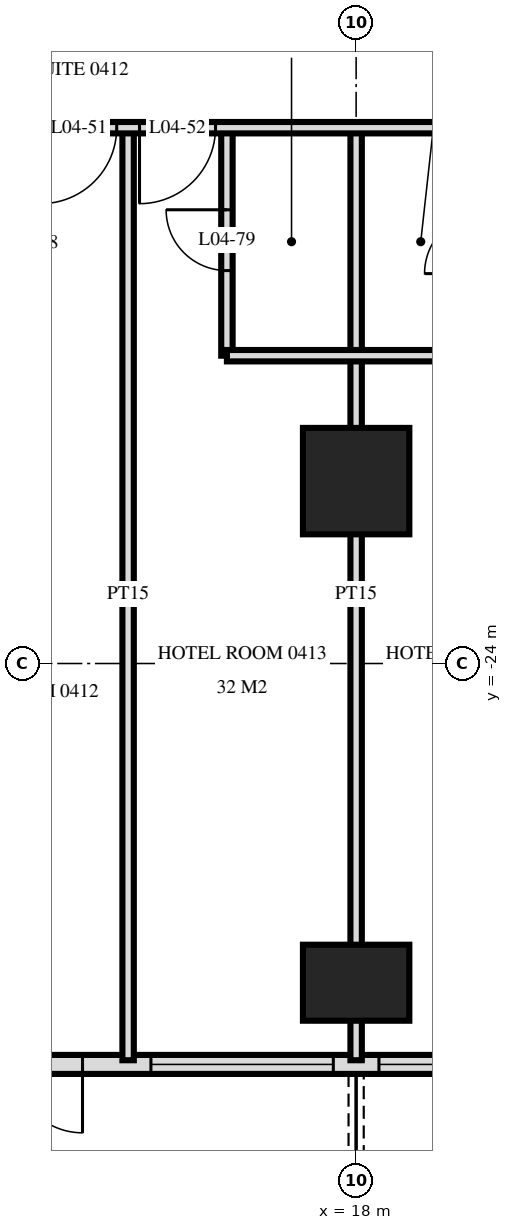
"""IFC4 building model, lengths in metres.
Left out: names, types, materials, properties, quantities, classifications, styles, units other than length and angle.
Written with IfcOpenShell. Run it as: python <this file> out.ifc"""

import sys

from ifc_helpers import new_model, si_unit, direction, frame, frame_2d, origin, origin_2d, place, context, subcontext, project, spatial, rectangle, extrude, element, fill, save


model = new_model("IFC4")
c1 = context("Model", 3, precision=1e-05, world=origin(), true_north=direction((0.0, 1.0)))
c2 = subcontext(c1, "Body", "Model", "MODEL_VIEW")
j1 = project(units=[si_unit("LENGTHUNIT", "METRE"), si_unit("PLANEANGLEUNIT", "RADIAN")], contexts=[c1])
p1 = place(None, origin())
s1 = spatial("IfcSite", under=j1, at=p1, CompositionType="ELEMENT")
p2 = place(p1, origin())
s2 = spatial("IfcBuilding", under=s1, at=p2, CompositionType="ELEMENT")
p3 = place(p2, frame((0.0, 0.0, 24.0)))
s3 = spatial("IfcBuildingStorey", under=s2, at=p3, CompositionType="ELEMENT", Elevation=24.0)
p4 = place(p3, frame((18.0, -28.2, -0.28), z_axis=(0.0, 0.0, 1.0), x_axis=(1.0, 0.0, 0.0)))
e1 = element("IfcColumn", 1, at=p4, inside=s3, PredefinedType="COLUMN", context=c2, shape_type="SweptSolid", body=[
    extrude(rectangle(XDim=1.4, YDim=1.0, at=origin_2d()), origin(), (0.0, 0.0, 1.0), 3.88),
])
p5 = place(p3, frame((18.0, -21.6, -0.28), z_axis=(0.0, 0.0, 1.0), x_axis=(1.0, 0.0, 0.0)))
e2 = element("IfcColumn", 2, at=p5, inside=s3, PredefinedType="COLUMN", context=c2, shape_type="SweptSolid", body=[
    extrude(rectangle(XDim=1.4, YDim=1.4, at=origin_2d()), origin(), (0.0, 0.0, 1.0), 3.88),
])
p6 = place(p3, frame((-28.775, -29.275, 0.0), z_axis=(0.0, 0.0, 1.0), x_axis=(1.0, 0.0, 0.0)))
e3 = element("IfcWall", 3, at=p6, inside=s3, PredefinedType="SOLIDWALL", context=c2, shape_type="SweptSolid", body=[
    extrude(rectangle(XDim=57.551, YDim=0.25, at=frame_2d((28.775, 0.0))), origin(), (0.0, 0.0, 1.0), 3.32),
])
p7 = place(p6, frame((0.575, 0.0, 0.0)))
e4 = element("IfcOpeningElement", 4, at=p7, cuts=e3, PredefinedType="OPENING", context=c2, shape_type="SweptSolid", body=[
    extrude(rectangle(XDim=1.8, YDim=2.4, at=frame_2d((0.9, 1.2))), frame((0.0, 0.135, 0.0), z_axis=(0.0, -1.0, 0.0), x_axis=(1.0, 0.0, 0.0)), (0.0, 0.0, 1.0), 0.27),
])
p8 = place(p6, frame((5.375, 0.0, 0.0)))
e5 = element("IfcOpeningElement", 5, at=p8, cuts=e3, PredefinedType="OPENING", context=c2, shape_type="SweptSolid", body=[
    extrude(rectangle(XDim=1.8, YDim=2.4, at=frame_2d((0.9, 1.2))), frame((0.0, 0.135, 0.0), z_axis=(0.0, -1.0, 0.0), x_axis=(1.0, 0.0, 0.0)), (0.0, 0.0, 1.0), 0.27),
])
p9 = place(p6, frame((8.075, 0.0, 0.3)))
e6 = element("IfcOpeningElement", 6, at=p9, cuts=e3, PredefinedType="OPENING", context=c2, shape_type="SweptSolid", body=[
    extrude(rectangle(XDim=2.4, YDim=2.1, at=frame_2d((1.2, 1.05))), frame((0.0, 0.135, 0.0), z_axis=(0.0, -1.0, 0.0), x_axis=(1.0, 0.0, 0.0)), (0.0, 0.0, 1.0), 0.27),
])
p10 = place(p6, frame((11.375, 0.0, 0.0)))
e7 = element("IfcOpeningElement", 7, at=p10, cuts=e3, PredefinedType="OPENING", context=c2, shape_type="SweptSolid", body=[
    extrude(rectangle(XDim=1.8, YDim=2.4, at=frame_2d((0.9, 1.2))), frame((0.0, 0.135, 0.0), z_axis=(0.0, -1.0, 0.0), x_axis=(1.0, 0.0, 0.0)), (0.0, 0.0, 1.0), 0.27),
])
p11 = place(p6, frame((14.075, 0.0, 0.3)))
e8 = element("IfcOpeningElement", 8, at=p11, cuts=e3, PredefinedType="OPENING", context=c2, shape_type="SweptSolid", body=[
    extrude(rectangle(XDim=2.4, YDim=2.1, at=frame_2d((1.2, 1.05))), frame((0.0, 0.135, 0.0), z_axis=(0.0, -1.0, 0.0), x_axis=(1.0, 0.0, 0.0)), (0.0, 0.0, 1.0), 0.27),
])
p12 = place(p6, frame((17.375, 0.0, 0.0)))
e9 = element("IfcOpeningElement", 9, at=p12, cuts=e3, PredefinedType="OPENING", context=c2, shape_type="SweptSolid", body=[
    extrude(rectangle(XDim=1.8, YDim=2.4, at=frame_2d((0.9, 1.2))), frame((0.0, 0.135, 0.0), z_axis=(0.0, -1.0, 0.0), x_axis=(1.0, 0.0, 0.0)), (0.0, 0.0, 1.0), 0.27),
])
p13 = place(p6, frame((20.075, 0.0, 0.3)))
e10 = element("IfcOpeningElement", 10, at=p13, cuts=e3, PredefinedType="OPENING", context=c2, shape_type="SweptSolid", body=[
    extrude(rectangle(XDim=2.4, YDim=2.1, at=frame_2d((1.2, 1.05))), frame((0.0, 0.135, 0.0), z_axis=(0.0, -1.0, 0.0), x_axis=(1.0, 0.0, 0.0)), (0.0, 0.0, 1.0), 0.27),
])
p14 = place(p6, frame((23.075, 0.0, 0.3)))
e11 = element("IfcOpeningElement", 11, at=p14, cuts=e3, PredefinedType="OPENING", context=c2, shape_type="SweptSolid", body=[
    extrude(rectangle(XDim=2.4, YDim=2.1, at=frame_2d((1.2, 1.05))), frame((0.0, 0.135, 0.0), z_axis=(0.0, -1.0, 0.0), x_axis=(1.0, 0.0, 0.0)), (0.0, 0.0, 1.0), 0.27),
])
p15 = place(p6, frame((26.375, 0.0, 0.0)))
e12 = element("IfcOpeningElement", 12, at=p15, cuts=e3, PredefinedType="OPENING", context=c2, shape_type="SweptSolid", body=[
    extrude(rectangle(XDim=1.8, YDim=2.4, at=frame_2d((0.9, 1.2))), frame((0.0, 0.135, 0.0), z_axis=(0.0, -1.0, 0.0), x_axis=(1.0, 0.0, 0.0)), (0.0, 0.0, 1.0), 0.27),
])
p16 = place(p6, frame((29.375, 0.0, 0.0)))
e13 = element("IfcOpeningElement", 13, at=p16, cuts=e3, PredefinedType="OPENING", context=c2, shape_type="SweptSolid", body=[
    extrude(rectangle(XDim=1.8, YDim=2.4, at=frame_2d((0.9, 1.2))), frame((0.0, 0.135, 0.0), z_axis=(0.0, -1.0, 0.0), x_axis=(1.0, 0.0, 0.0)), (0.0, 0.0, 1.0), 0.27),
])
p17 = place(p6, frame((32.075, 0.0, 0.3)))
e14 = element("IfcOpeningElement", 14, at=p17, cuts=e3, PredefinedType="OPENING", context=c2, shape_type="SweptSolid", body=[
    extrude(rectangle(XDim=2.4, YDim=2.1, at=frame_2d((1.2, 1.05))), frame((0.0, 0.135, 0.0), z_axis=(0.0, -1.0, 0.0), x_axis=(1.0, 0.0, 0.0)), (0.0, 0.0, 1.0), 0.27),
])
p18 = place(p6, frame((35.375, 0.0, 0.0)))
e15 = element("IfcOpeningElement", 15, at=p18, cuts=e3, PredefinedType="OPENING", context=c2, shape_type="SweptSolid", body=[
    extrude(rectangle(XDim=1.8, YDim=2.4, at=frame_2d((0.9, 1.2))), frame((0.0, 0.135, 0.0), z_axis=(0.0, -1.0, 0.0), x_axis=(1.0, 0.0, 0.0)), (0.0, 0.0, 1.0), 0.27),
])
p19 = place(p6, frame((38.075, 0.0, 0.3)))
e16 = element("IfcOpeningElement", 16, at=p19, cuts=e3, PredefinedType="OPENING", context=c2, shape_type="SweptSolid", body=[
    extrude(rectangle(XDim=2.4, YDim=2.1, at=frame_2d((1.2, 1.05))), frame((0.0, 0.135, 0.0), z_axis=(0.0, -1.0, 0.0), x_axis=(1.0, 0.0, 0.0)), (0.0, 0.0, 1.0), 0.27),
])
p20 = place(p6, frame((41.375, 0.0, 0.0)))
e17 = element("IfcOpeningElement", 17, at=p20, cuts=e3, PredefinedType="OPENING", context=c2, shape_type="SweptSolid", body=[
    extrude(rectangle(XDim=1.8, YDim=2.4, at=frame_2d((0.9, 1.2))), frame((0.0, 0.135, 0.0), z_axis=(0.0, -1.0, 0.0), x_axis=(1.0, 0.0, 0.0)), (0.0, 0.0, 1.0), 0.27),
])
p21 = place(p6, frame((44.075, 0.0, 0.3)))
e18 = element("IfcOpeningElement", 18, at=p21, cuts=e3, PredefinedType="OPENING", context=c2, shape_type="SweptSolid", body=[
    extrude(rectangle(XDim=2.4, YDim=2.1, at=frame_2d((1.2, 1.05))), frame((0.0, 0.135, 0.0), z_axis=(0.0, -1.0, 0.0), x_axis=(1.0, 0.0, 0.0)), (0.0, 0.0, 1.0), 0.27),
])
p22 = place(p6, frame((47.075, 0.0, 0.3)))
e19 = element("IfcOpeningElement", 19, at=p22, cuts=e3, PredefinedType="OPENING", context=c2, shape_type="SweptSolid", body=[
    extrude(rectangle(XDim=2.4, YDim=2.1, at=frame_2d((1.2, 1.05))), frame((0.0, 0.135, 0.0), z_axis=(0.0, -1.0, 0.0), x_axis=(1.0, 0.0, 0.0)), (0.0, 0.0, 1.0), 0.27),
])
p23 = place(p6, frame((50.375, 0.0, 0.0)))
e20 = element("IfcOpeningElement", 20, at=p23, cuts=e3, PredefinedType="OPENING", context=c2, shape_type="SweptSolid", body=[
    extrude(rectangle(XDim=1.8, YDim=2.4, at=frame_2d((0.9, 1.2))), frame((0.0, 0.135, 0.0), z_axis=(0.0, -1.0, 0.0), x_axis=(1.0, 0.0, 0.0)), (0.0, 0.0, 1.0), 0.27),
])
p24 = place(p6, frame((53.375, 0.0, 0.0)))
e21 = element("IfcOpeningElement", 21, at=p24, cuts=e3, PredefinedType="OPENING", context=c2, shape_type="SweptSolid", body=[
    extrude(rectangle(XDim=1.8, YDim=2.4, at=frame_2d((0.9, 1.2))), frame((0.0, 0.135, 0.0), z_axis=(0.0, -1.0, 0.0), x_axis=(1.0, 0.0, 0.0)), (0.0, 0.0, 1.0), 0.27),
])
p25 = place(p3, frame((18.0, -29.22, 0.0), z_axis=(0.0, 0.0, 1.0), x_axis=(0.0, 1.0, 0.0)))
e22 = element("IfcWall", 22, at=p25, inside=s3, PredefinedType="PARTITIONING", context=c2, shape_type="SweptSolid", body=[
    extrude(rectangle(XDim=12.27, YDim=0.15, at=frame_2d((6.135, 0.0))), origin(), (0.0, 0.0, 1.0), 3.32),
])
p26 = place(p3, frame((16.3, -19.95, 0.0), z_axis=(0.0, 0.0, 1.0), x_axis=(0.0, 1.0, 0.0)))
e23 = element("IfcWall", 23, at=p26, inside=s3, PredefinedType="PARTITIONING", context=c2, shape_type="SweptSolid", body=[
    extrude(rectangle(XDim=3.0, YDim=0.15, at=frame_2d((1.5, 0.0))), origin(), (0.0, 0.0, 1.0), 3.32),
])
p27 = place(p26, frame((1.12, 0.0, 0.0)))
e24 = element("IfcOpeningElement", 24, at=p27, cuts=e23, PredefinedType="OPENING", context=c2, shape_type="SweptSolid", body=[
    extrude(rectangle(XDim=0.8, YDim=2.1, at=frame_2d((0.4, 1.05))), frame((0.0, 0.085, 0.0), z_axis=(0.0, -1.0, 0.0), x_axis=(1.0, 0.0, 0.0)), (0.0, 0.0, 1.0), 0.17),
])
p28 = place(p3, frame((15.0, -29.22, 0.0), z_axis=(0.0, 0.0, 1.0), x_axis=(0.0, 1.0, 0.0)))
e25 = element("IfcWall", 25, at=p28, inside=s3, PredefinedType="PARTITIONING", context=c2, shape_type="SweptSolid", body=[
    extrude(rectangle(XDim=12.27, YDim=0.15, at=frame_2d((6.135, 0.0))), origin(), (0.0, 0.0, 1.0), 3.32),
])
p29 = place(p3, frame((16.3, -19.95, 0.0), z_axis=(0.0, 0.0, 1.0), x_axis=(1.0, 0.0, 0.0)))
e26 = element("IfcWall", 26, at=p29, inside=s3, PredefinedType="PARTITIONING", context=c2, shape_type="SweptSolid", body=[
    extrude(rectangle(XDim=3.4, YDim=0.15, at=frame_2d((1.7, 0.0))), origin(), (0.0, 0.0, 1.0), 3.32),
])
p30 = place(p3, frame((-33.12, -16.95, 0.0), z_axis=(0.0, 0.0, 1.0), x_axis=(1.0, 0.0, 0.0)))
e27 = element("IfcWall", 27, at=p30, inside=s3, PredefinedType="PARTITIONING", context=c2, shape_type="SweptSolid", body=[
    extrude(rectangle(XDim=66.24, YDim=0.15, at=frame_2d((33.12, 0.0))), origin(), (0.0, 0.0, 1.0), 3.32),
])
p31 = place(p30, frame((9.27, 0.0, 0.0)))
e28 = element("IfcOpeningElement", 28, at=p31, cuts=e27, PredefinedType="OPENING", context=c2, shape_type="SweptSolid", body=[
    extrude(rectangle(XDim=1.0, YDim=2.1, at=frame_2d((0.5, 1.05))), frame((0.0, 0.085, 0.0), z_axis=(0.0, -1.0, 0.0), x_axis=(1.0, 0.0, 0.0)), (0.0, 0.0, 1.0), 0.17),
])
p32 = place(p30, frame((13.97, 0.0, 0.0)))
e29 = element("IfcOpeningElement", 29, at=p32, cuts=e27, PredefinedType="OPENING", context=c2, shape_type="SweptSolid", body=[
    extrude(rectangle(XDim=1.0, YDim=2.1, at=frame_2d((0.5, 1.05))), frame((0.0, 0.085, 0.0), z_axis=(0.0, -1.0, 0.0), x_axis=(1.0, 0.0, 0.0)), (0.0, 0.0, 1.0), 0.17),
])
p33 = place(p30, frame((15.27, 0.0, 0.0)))
e30 = element("IfcOpeningElement", 30, at=p33, cuts=e27, PredefinedType="OPENING", context=c2, shape_type="SweptSolid", body=[
    extrude(rectangle(XDim=1.0, YDim=2.1, at=frame_2d((0.5, 1.05))), frame((0.0, 0.085, 0.0), z_axis=(0.0, -1.0, 0.0), x_axis=(1.0, 0.0, 0.0)), (0.0, 0.0, 1.0), 0.17),
])
p34 = place(p30, frame((19.97, 0.0, 0.0)))
e31 = element("IfcOpeningElement", 31, at=p34, cuts=e27, PredefinedType="OPENING", context=c2, shape_type="SweptSolid", body=[
    extrude(rectangle(XDim=1.0, YDim=2.1, at=frame_2d((0.5, 1.05))), frame((0.0, 0.085, 0.0), z_axis=(0.0, -1.0, 0.0), x_axis=(1.0, 0.0, 0.0)), (0.0, 0.0, 1.0), 0.17),
])
p35 = place(p30, frame((22.27, 0.0, 0.0)))
e32 = element("IfcOpeningElement", 32, at=p35, cuts=e27, PredefinedType="OPENING", context=c2, shape_type="SweptSolid", body=[
    extrude(rectangle(XDim=1.0, YDim=2.1, at=frame_2d((0.5, 1.05))), frame((0.0, 0.085, 0.0), z_axis=(0.0, -1.0, 0.0), x_axis=(1.0, 0.0, 0.0)), (0.0, 0.0, 1.0), 0.17),
])
p36 = place(p30, frame((28.97, 0.0, 0.0)))
e33 = element("IfcOpeningElement", 33, at=p36, cuts=e27, PredefinedType="OPENING", context=c2, shape_type="SweptSolid", body=[
    extrude(rectangle(XDim=1.0, YDim=2.1, at=frame_2d((0.5, 1.05))), frame((0.0, 0.085, 0.0), z_axis=(0.0, -1.0, 0.0), x_axis=(1.0, 0.0, 0.0)), (0.0, 0.0, 1.0), 0.17),
])
p37 = place(p30, frame((30.27, 0.0, 0.0)))
e34 = element("IfcOpeningElement", 34, at=p37, cuts=e27, PredefinedType="OPENING", context=c2, shape_type="SweptSolid", body=[
    extrude(rectangle(XDim=1.0, YDim=2.1, at=frame_2d((0.5, 1.05))), frame((0.0, 0.085, 0.0), z_axis=(0.0, -1.0, 0.0), x_axis=(1.0, 0.0, 0.0)), (0.0, 0.0, 1.0), 0.17),
])
p38 = place(p30, frame((34.97, 0.0, 0.0)))
e35 = element("IfcOpeningElement", 35, at=p38, cuts=e27, PredefinedType="OPENING", context=c2, shape_type="SweptSolid", body=[
    extrude(rectangle(XDim=1.0, YDim=2.1, at=frame_2d((0.5, 1.05))), frame((0.0, 0.085, 0.0), z_axis=(0.0, -1.0, 0.0), x_axis=(1.0, 0.0, 0.0)), (0.0, 0.0, 1.0), 0.17),
])
p39 = place(p30, frame((36.27, 0.0, 0.0)))
e36 = element("IfcOpeningElement", 36, at=p39, cuts=e27, PredefinedType="OPENING", context=c2, shape_type="SweptSolid", body=[
    extrude(rectangle(XDim=1.0, YDim=2.1, at=frame_2d((0.5, 1.05))), frame((0.0, 0.085, 0.0), z_axis=(0.0, -1.0, 0.0), x_axis=(1.0, 0.0, 0.0)), (0.0, 0.0, 1.0), 0.17),
])
p40 = place(p30, frame((40.97, 0.0, 0.0)))
e37 = element("IfcOpeningElement", 37, at=p40, cuts=e27, PredefinedType="OPENING", context=c2, shape_type="SweptSolid", body=[
    extrude(rectangle(XDim=1.0, YDim=2.1, at=frame_2d((0.5, 1.05))), frame((0.0, 0.085, 0.0), z_axis=(0.0, -1.0, 0.0), x_axis=(1.0, 0.0, 0.0)), (0.0, 0.0, 1.0), 0.17),
])
p41 = place(p30, frame((42.27, 0.0, 0.0)))
e38 = element("IfcOpeningElement", 38, at=p41, cuts=e27, PredefinedType="OPENING", context=c2, shape_type="SweptSolid", body=[
    extrude(rectangle(XDim=1.0, YDim=2.1, at=frame_2d((0.5, 1.05))), frame((0.0, 0.085, 0.0), z_axis=(0.0, -1.0, 0.0), x_axis=(1.0, 0.0, 0.0)), (0.0, 0.0, 1.0), 0.17),
])
p42 = place(p30, frame((46.97, 0.0, 0.0)))
e39 = element("IfcOpeningElement", 39, at=p42, cuts=e27, PredefinedType="OPENING", context=c2, shape_type="SweptSolid", body=[
    extrude(rectangle(XDim=1.0, YDim=2.1, at=frame_2d((0.5, 1.05))), frame((0.0, 0.085, 0.0), z_axis=(0.0, -1.0, 0.0), x_axis=(1.0, 0.0, 0.0)), (0.0, 0.0, 1.0), 0.17),
])
p43 = place(p30, frame((48.27, 0.0, 0.0)))
e40 = element("IfcOpeningElement", 40, at=p43, cuts=e27, PredefinedType="OPENING", context=c2, shape_type="SweptSolid", body=[
    extrude(rectangle(XDim=1.0, YDim=2.1, at=frame_2d((0.5, 1.05))), frame((0.0, 0.085, 0.0), z_axis=(0.0, -1.0, 0.0), x_axis=(1.0, 0.0, 0.0)), (0.0, 0.0, 1.0), 0.17),
])
p44 = place(p30, frame((52.97, 0.0, 0.0)))
e41 = element("IfcOpeningElement", 41, at=p44, cuts=e27, PredefinedType="OPENING", context=c2, shape_type="SweptSolid", body=[
    extrude(rectangle(XDim=1.0, YDim=2.1, at=frame_2d((0.5, 1.05))), frame((0.0, 0.085, 0.0), z_axis=(0.0, -1.0, 0.0), x_axis=(1.0, 0.0, 0.0)), (0.0, 0.0, 1.0), 0.17),
])
p45 = place(p30, frame((54.27, 0.0, 0.0)))
e42 = element("IfcOpeningElement", 42, at=p45, cuts=e27, PredefinedType="OPENING", context=c2, shape_type="SweptSolid", body=[
    extrude(rectangle(XDim=1.0, YDim=2.1, at=frame_2d((0.5, 1.05))), frame((0.0, 0.085, 0.0), z_axis=(0.0, -1.0, 0.0), x_axis=(1.0, 0.0, 0.0)), (0.0, 0.0, 1.0), 0.17),
])
p46 = place(p30, frame((4.4, 0.0, 0.0)))
e43 = element("IfcOpeningElement", 43, at=p46, cuts=e27, PredefinedType="OPENING", context=c2, shape_type="SweptSolid", body=[
    extrude(rectangle(XDim=1.0, YDim=2.1, at=frame_2d((0.5, 1.05))), frame((0.0, 0.085, 0.0), z_axis=(0.0, -1.0, 0.0), x_axis=(1.0, 0.0, 0.0)), (0.0, 0.0, 1.0), 0.17),
])
p47 = place(p30, frame((60.8, 0.0, 0.0)))
e44 = element("IfcOpeningElement", 44, at=p47, cuts=e27, PredefinedType="OPENING", context=c2, shape_type="SweptSolid", body=[
    extrude(rectangle(XDim=1.0, YDim=2.1, at=frame_2d((0.5, 1.05))), frame((0.0, 0.085, 0.0), z_axis=(0.0, -1.0, 0.0), x_axis=(1.0, 0.0, 0.0)), (0.0, 0.0, 1.0), 0.17),
])
p48 = place(p20, frame((0.9, 0.0, 0.0), z_axis=(0.0, 0.0, 1.0), x_axis=(-1.0, 0.0, 0.0)))
e45 = element("IfcDoor", 45, at=p48, inside=s3, OperationType="DOUBLE_DOOR_SINGLE_SWING", PredefinedType="DOOR", context=c2, shape_type="SweptSolid", body=[
    extrude(rectangle(XDim=1.8, YDim=2.4, at=frame_2d((0.0, 1.2))), frame((0.0, -0.025, 0.0), z_axis=(0.0, 1.0, 0.0), x_axis=(-1.0, 0.0, 0.0)), (0.0, 0.0, 1.0), 0.05),
])
fill(e17, e45)
p49 = place(p21, origin())
e46 = element("IfcWindow", 46, at=p49, inside=s3, PartitioningType="SINGLE_PANEL", PredefinedType="WINDOW", context=c2, shape_type="SweptSolid", body=[
    extrude(rectangle(XDim=2.4, YDim=2.1, at=frame_2d((1.2, 1.05))), frame((0.0, 0.03, 0.0), z_axis=(0.0, -1.0, 0.0), x_axis=(1.0, 0.0, 0.0)), (0.0, 0.0, 1.0), 0.06),
])
fill(e18, e46)
p50 = place(p22, origin())
e47 = element("IfcWindow", 47, at=p50, inside=s3, PartitioningType="SINGLE_PANEL", PredefinedType="WINDOW", context=c2, shape_type="SweptSolid", body=[
    extrude(rectangle(XDim=2.4, YDim=2.1, at=frame_2d((1.2, 1.05))), frame((0.0, 0.03, 0.0), z_axis=(0.0, -1.0, 0.0), x_axis=(1.0, 0.0, 0.0)), (0.0, 0.0, 1.0), 0.06),
])
fill(e19, e47)
p51 = place(p42, frame((0.5, 0.0, 0.0), z_axis=(0.0, 0.0, 1.0), x_axis=(-1.0, 0.0, 0.0)))
e48 = element("IfcDoor", 48, at=p51, inside=s3, OperationType="SINGLE_SWING_LEFT", PredefinedType="DOOR", context=c2, shape_type="SweptSolid", body=[
    extrude(rectangle(XDim=1.0, YDim=2.1, at=frame_2d((0.0, 1.05))), frame((0.0, -0.025, 0.0), z_axis=(0.0, 1.0, 0.0), x_axis=(-1.0, 0.0, 0.0)), (0.0, 0.0, 1.0), 0.05),
])
fill(e39, e48)
p52 = place(p43, frame((0.5, 0.0, 0.0), z_axis=(0.0, 0.0, 1.0), x_axis=(-1.0, 0.0, 0.0)))
e49 = element("IfcDoor", 49, at=p52, inside=s3, OperationType="SINGLE_SWING_LEFT", PredefinedType="DOOR", context=c2, shape_type="SweptSolid", body=[
    extrude(rectangle(XDim=1.0, YDim=2.1, at=frame_2d((0.0, 1.05))), frame((0.0, -0.025, 0.0), z_axis=(0.0, 1.0, 0.0), x_axis=(-1.0, 0.0, 0.0)), (0.0, 0.0, 1.0), 0.05),
])
fill(e40, e49)
p53 = place(p27, origin())
e50 = element("IfcDoor", 50, at=p53, inside=s3, OperationType="SINGLE_SWING_LEFT", PredefinedType="DOOR", context=c2, shape_type="SweptSolid", body=[
    extrude(rectangle(XDim=0.8, YDim=2.1, at=frame_2d((0.4, 1.05))), frame((0.0, 0.025, 0.0), z_axis=(0.0, -1.0, 0.0), x_axis=(1.0, 0.0, 0.0)), (0.0, 0.0, 1.0), 0.05),
])
fill(e24, e50)
save(model, sys.argv[1])
